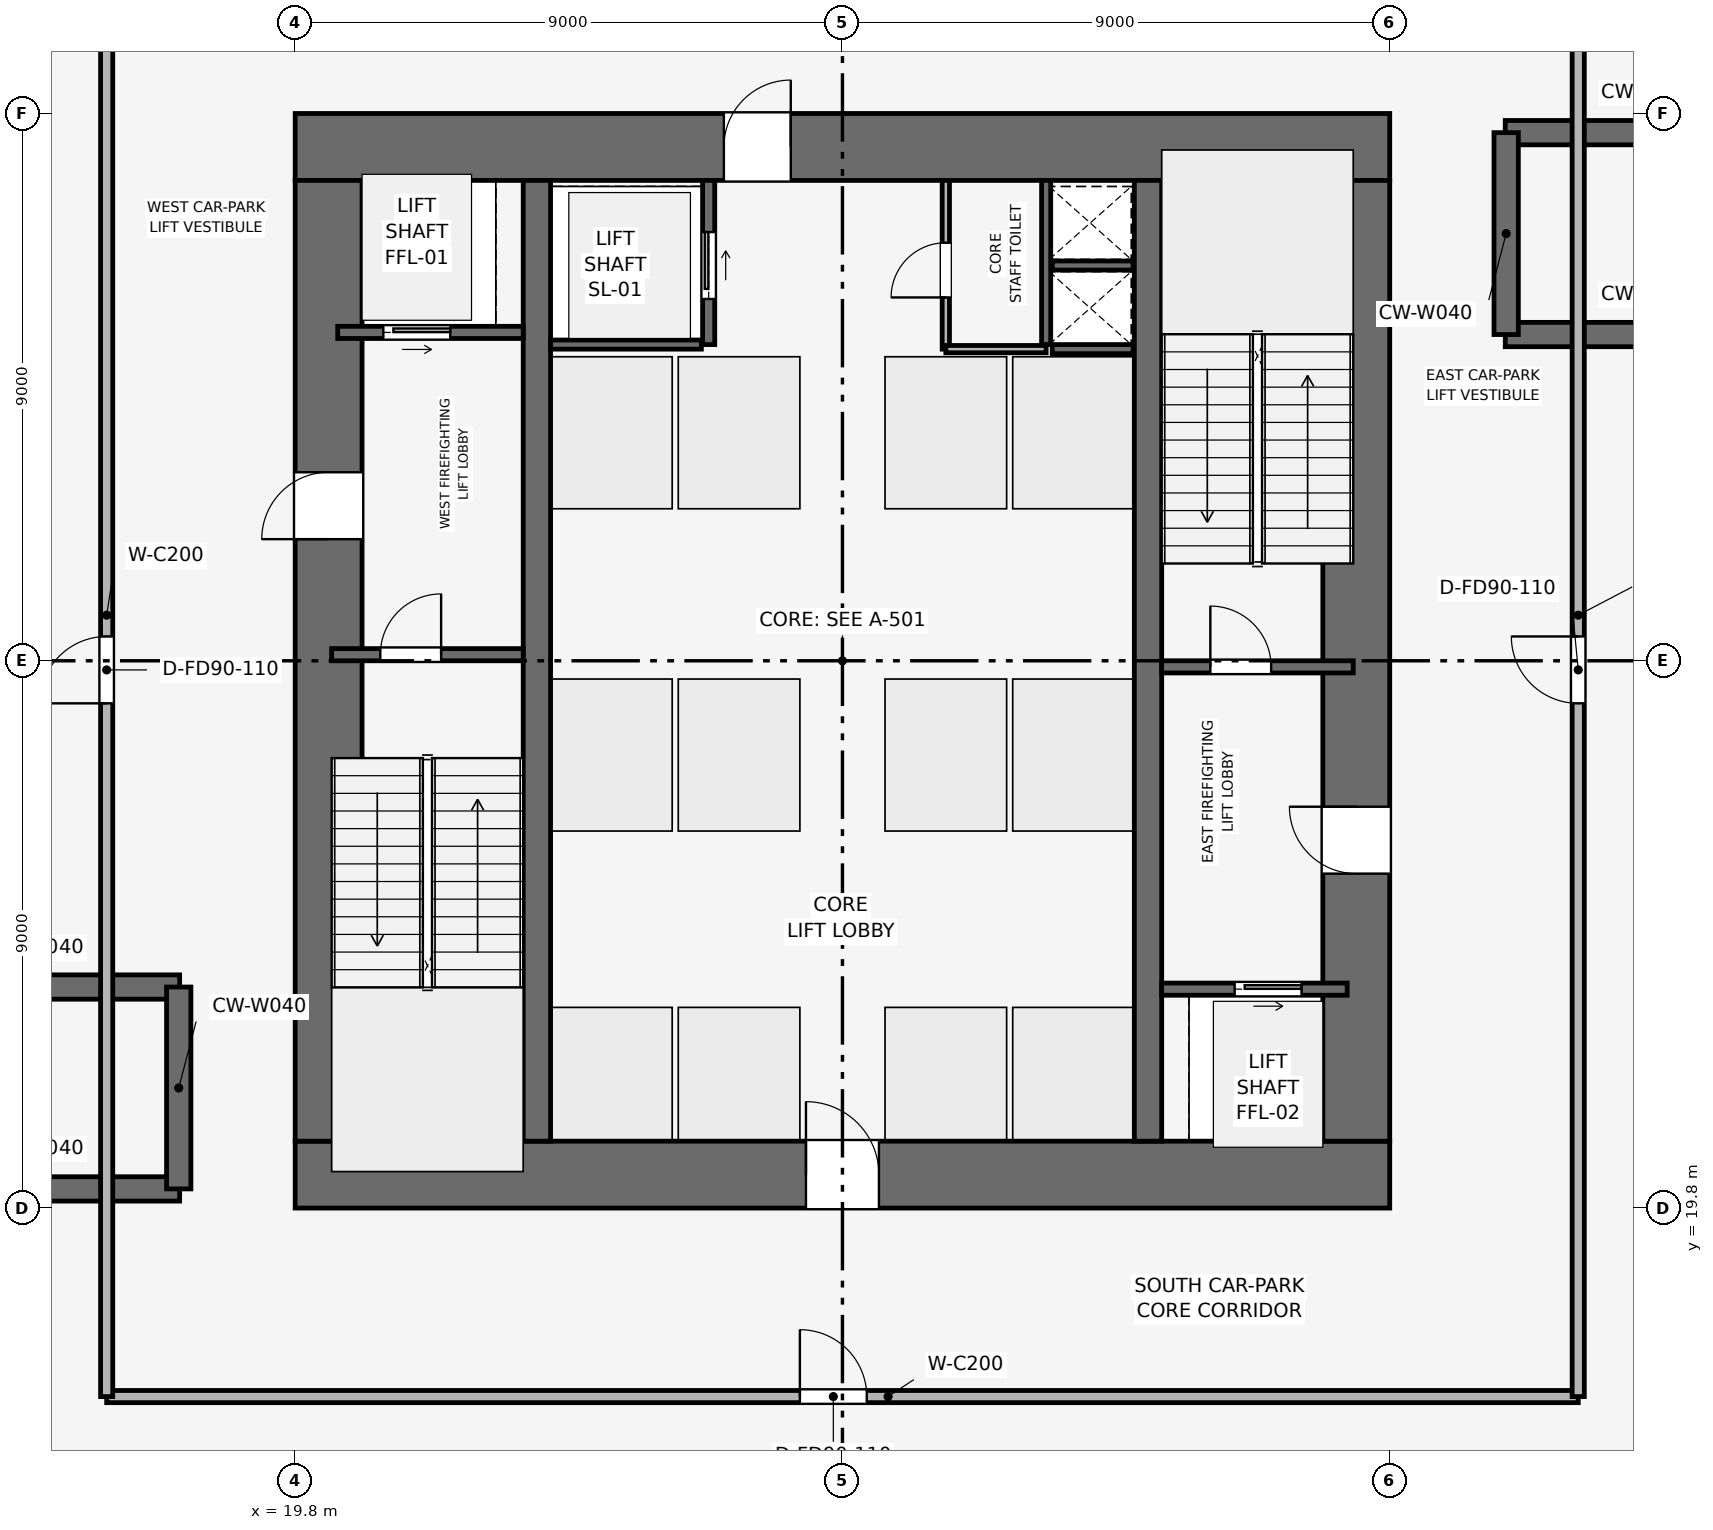
"""IFC4 building model, lengths in metres.
Left out: names, types, materials, properties, quantities, classifications, styles, units other than length and angle.
Written with IfcOpenShell. Run it as: python <this file> out.ifc"""

import sys

from ifc_helpers import new_model, si_unit, direction, frame, frame_2d, origin, place, context, subcontext, project, spatial, rectangle, extrude, element, fill, save


model = new_model("IFC4")
c1 = context("Model", 3, precision=1e-05, world=origin(), true_north=direction((0.0, 1.0)))
c2 = subcontext(c1, "Body", "Model", "MODEL_VIEW")
j1 = project(units=[si_unit("LENGTHUNIT", "METRE"), si_unit("PLANEANGLEUNIT", "RADIAN")], contexts=[c1])
p1 = place(None, origin())
s1 = spatial("IfcSite", under=j1, at=p1, CompositionType="ELEMENT")
p2 = place(p1, origin())
s2 = spatial("IfcBuilding", under=s1, at=p2, CompositionType="ELEMENT")
p3 = place(p2, frame((0.0, 0.0, -4.8)))
s3 = spatial("IfcBuildingStorey", under=s2, at=p3, CompositionType="ELEMENT", Elevation=-4.8)
p4 = place(p3, frame((19.8, 20.35, 0.0), z_axis=(0.0, 0.0, 1.0), x_axis=(1.0, 0.0, 0.0)))
e1 = element("IfcWall", 1, at=p4, inside=s3, PredefinedType="SHEAR", context=c2, shape_type="SweptSolid", body=[
    extrude(rectangle(XDim=18.0, YDim=1.1, at=frame_2d((9.0, 0.0))), origin(), (0.0, 0.0, 1.0), 4.8),
])
p5 = place(p4, frame((8.4, 0.0, 0.0)))
e2 = element("IfcOpeningElement", 2, at=p5, cuts=e1, PredefinedType="OPENING", context=c2, shape_type="SweptSolid", body=[
    extrude(rectangle(XDim=1.2, YDim=2.2, at=frame_2d((0.6, 1.1))), frame((0.0, 0.56, 0.0), z_axis=(0.0, -1.0, 0.0), x_axis=(1.0, 0.0, 0.0)), (0.0, 0.0, 1.0), 1.12),
])
p6 = place(p3, frame((19.8, 37.25, 0.0), z_axis=(0.0, 0.0, 1.0), x_axis=(1.0, 0.0, 0.0)))
e3 = element("IfcWall", 3, at=p6, inside=s3, PredefinedType="SHEAR", context=c2, shape_type="SweptSolid", body=[
    extrude(rectangle(XDim=18.0, YDim=1.1, at=frame_2d((9.0, 0.0))), origin(), (0.0, 0.0, 1.0), 4.8),
])
p7 = place(p6, frame((7.05, 0.0, 0.0)))
e4 = element("IfcOpeningElement", 4, at=p7, cuts=e3, PredefinedType="OPENING", context=c2, shape_type="SweptSolid", body=[
    extrude(rectangle(XDim=1.1, YDim=2.15, at=frame_2d((0.55, 1.075))), frame((0.0, 0.56, 0.0), z_axis=(0.0, -1.0, 0.0), x_axis=(1.0, 0.0, 0.0)), (0.0, 0.0, 1.0), 1.12),
])
p8 = place(p3, frame((20.35, 20.9, 0.0), z_axis=(0.0, 0.0, 1.0), x_axis=(0.0, 1.0, 0.0)))
e5 = element("IfcWall", 5, at=p8, inside=s3, PredefinedType="SHEAR", context=c2, shape_type="SweptSolid", body=[
    extrude(rectangle(XDim=15.8, YDim=1.1, at=frame_2d((7.9, 0.0))), origin(), (0.0, 0.0, 1.0), 4.8),
])
p9 = place(p8, frame((9.9, 0.0, 0.0)))
e6 = element("IfcOpeningElement", 6, at=p9, cuts=e5, PredefinedType="OPENING", context=c2, shape_type="SweptSolid", body=[
    extrude(rectangle(XDim=1.1, YDim=2.15, at=frame_2d((0.55, 1.075))), frame((0.0, 0.56, 0.0), z_axis=(0.0, -1.0, 0.0), x_axis=(1.0, 0.0, 0.0)), (0.0, 0.0, 1.0), 1.12),
])
p10 = place(p3, frame((37.25, 20.9, 0.0), z_axis=(0.0, 0.0, 1.0), x_axis=(0.0, 1.0, 0.0)))
e7 = element("IfcWall", 7, at=p10, inside=s3, PredefinedType="SHEAR", context=c2, shape_type="SweptSolid", body=[
    extrude(rectangle(XDim=15.8, YDim=1.1, at=frame_2d((7.9, 0.0))), origin(), (0.0, 0.0, 1.0), 4.8),
])
p11 = place(p10, frame((4.4, 0.0, 0.0)))
e8 = element("IfcOpeningElement", 8, at=p11, cuts=e7, PredefinedType="OPENING", context=c2, shape_type="SweptSolid", body=[
    extrude(rectangle(XDim=1.1, YDim=2.15, at=frame_2d((0.55, 1.075))), frame((0.0, 0.56, 0.0), z_axis=(0.0, -1.0, 0.0), x_axis=(1.0, 0.0, 0.0)), (0.0, 0.0, 1.0), 1.12),
])
for number, where, z_axis, x_axis in (
    (9, (23.775, 20.9, 0.0), (0.0, 0.0, 1.0), (0.0, 1.0, 0.0)),
    (10, (33.825, 20.9, 0.0), (0.0, 0.0, 1.0), (0.0, 1.0, 0.0)),
):
    element("IfcWall", number, at=place(p3, frame(where, z_axis=z_axis, x_axis=x_axis)), inside=s3, PredefinedType="SHEAR", context=c2, shape_type="SweptSolid", body=[
        extrude(rectangle(XDim=15.8, YDim=0.45, at=frame_2d((7.9, 0.0))), origin(), (0.0, 0.0, 1.0), 4.8),
    ])
for number, where, z_axis, x_axis in (
    (11, (13.2, 20.115, 0.002), (0.0, 0.0, 1.0), (1.0, 0.0, 0.0)),
    (12, (13.2, 23.435, 0.002), (0.0, 0.0, 1.0), (1.0, 0.0, 0.0)),
):
    element("IfcWall", number, at=place(p3, frame(where, z_axis=z_axis, x_axis=x_axis)), inside=s3, PredefinedType="SHEAR", context=c2, shape_type="SweptSolid", body=[
        extrude(rectangle(XDim=4.7, YDim=0.4, at=frame_2d((2.35, 0.0))), origin(), (0.0, 0.0, 1.0), 4.396),
    ])
p12 = place(p3, frame((17.885, 20.115, 0.002), z_axis=(0.0, 0.0, 1.0), x_axis=(0.0, 1.0, 0.0)))
e13 = element("IfcWall", 13, at=p12, inside=s3, PredefinedType="SHEAR", context=c2, shape_type="SweptSolid", body=[
    extrude(rectangle(XDim=3.32, YDim=0.4, at=frame_2d((1.66, 0.0))), origin(), (0.0, 0.0, 1.0), 4.396),
])
for number, where, z_axis, x_axis in (
    (14, (39.7, 34.165, 0.002), (0.0, 0.0, 1.0), (1.0, 0.0, 0.0)),
    (15, (39.7, 37.485, 0.002), (0.0, 0.0, 1.0), (1.0, 0.0, 0.0)),
):
    element("IfcWall", number, at=place(p3, frame(where, z_axis=z_axis, x_axis=x_axis)), inside=s3, PredefinedType="SHEAR", context=c2, shape_type="SweptSolid", body=[
        extrude(rectangle(XDim=4.7, YDim=0.4, at=frame_2d((2.35, 0.0))), origin(), (0.0, 0.0, 1.0), 4.396),
    ])
p13 = place(p3, frame((39.715, 34.165, 0.002), z_axis=(0.0, 0.0, 1.0), x_axis=(0.0, 1.0, 0.0)))
e16 = element("IfcWall", 16, at=p13, inside=s3, PredefinedType="SHEAR", context=c2, shape_type="SweptSolid", body=[
    extrude(rectangle(XDim=3.32, YDim=0.4, at=frame_2d((1.66, 0.0))), origin(), (0.0, 0.0, 1.0), 4.396),
])
p14 = place(p3, frame((20.4, 28.9, 0.0), z_axis=(0.0, 0.0, 1.0), x_axis=(1.0, 0.0, 0.0)))
e17 = element("IfcWall", 17, at=p14, inside=s3, PredefinedType="SHEAR", context=c2, shape_type="SweptSolid", body=[
    extrude(rectangle(XDim=3.15, YDim=0.2, at=frame_2d((1.575, 0.0))), origin(), (0.0, 0.0, 1.0), 4.4),
])
p15 = place(p14, frame((0.8, 0.0, 0.0)))
e18 = element("IfcOpeningElement", 18, at=p15, cuts=e17, PredefinedType="OPENING", context=c2, shape_type="SweptSolid", body=[
    extrude(rectangle(XDim=1.0, YDim=2.1, at=frame_2d((0.5, 1.05))), frame((0.0, 0.11, 0.0), z_axis=(0.0, -1.0, 0.0), x_axis=(1.0, 0.0, 0.0)), (0.0, 0.0, 1.0), 0.22),
])
p16 = place(p3, frame((34.05, 28.7, 0.0), z_axis=(0.0, 0.0, 1.0), x_axis=(1.0, 0.0, 0.0)))
e19 = element("IfcWall", 19, at=p16, inside=s3, PredefinedType="SHEAR", context=c2, shape_type="SweptSolid", body=[
    extrude(rectangle(XDim=3.15, YDim=0.2, at=frame_2d((1.575, 0.0))), origin(), (0.0, 0.0, 1.0), 4.4),
])
p17 = place(p16, frame((0.8, 0.0, 0.0)))
e20 = element("IfcOpeningElement", 20, at=p17, cuts=e19, PredefinedType="OPENING", context=c2, shape_type="SweptSolid", body=[
    extrude(rectangle(XDim=1.0, YDim=2.1, at=frame_2d((0.5, 1.05))), frame((0.0, 0.11, 0.0), z_axis=(0.0, -1.0, 0.0), x_axis=(1.0, 0.0, 0.0)), (0.0, 0.0, 1.0), 0.22),
])
p18 = place(p3, frame((32.15, 34.0, 0.0), z_axis=(0.0, 0.0, 1.0), x_axis=(0.0, 1.0, 0.0)))
e21 = element("IfcWall", 21, at=p18, inside=s3, PredefinedType="SHEAR", context=c2, shape_type="SweptSolid", body=[
    extrude(rectangle(XDim=2.7, YDim=0.15, at=frame_2d((1.35, 0.0))), origin(), (0.0, 0.0, 1.0), 4.4),
])
for number, where, z_axis, x_axis in (
    (22, (32.25, 33.925, 0.0), (0.0, 0.0, 1.0), (1.0, 0.0, 0.0)),
    (23, (32.25, 35.3, 0.0), (0.0, 0.0, 1.0), (1.0, 0.0, 0.0)),
):
    element("IfcWall", number, at=place(p3, frame(where, z_axis=z_axis, x_axis=x_axis)), inside=s3, PredefinedType="SHEAR", context=c2, shape_type="SweptSolid", body=[
        extrude(rectangle(XDim=1.33, YDim=0.15, at=frame_2d((0.665, 0.0))), origin(), (0.0, 0.0, 1.0), 4.4),
    ])
p19 = place(p3, frame((20.5, 34.2, 0.0), z_axis=(0.0, 0.0, 1.0), x_axis=(1.0, 0.0, 0.0)))
e24 = element("IfcWall", 24, at=p19, inside=s3, PredefinedType="SHEAR", context=c2, shape_type="SweptSolid", body=[
    extrude(rectangle(XDim=3.05, YDim=0.2, at=frame_2d((1.525, 0.0))), origin(), (0.0, 0.0, 1.0), 4.4),
])
p20 = place(p19, frame((0.75, 0.0, 0.0)))
e25 = element("IfcOpeningElement", 25, at=p20, cuts=e24, PredefinedType="OPENING", context=c2, shape_type="SweptSolid", body=[
    extrude(rectangle(XDim=1.1, YDim=2.15, at=frame_2d((0.55, 1.075))), frame((0.0, 0.11, 0.0), z_axis=(0.0, -1.0, 0.0), x_axis=(1.0, 0.0, 0.0)), (0.0, 0.0, 1.0), 0.22),
])
p21 = place(p3, frame((34.05, 23.4, 0.0), z_axis=(0.0, 0.0, 1.0), x_axis=(1.0, 0.0, 0.0)))
e26 = element("IfcWall", 26, at=p21, inside=s3, PredefinedType="SHEAR", context=c2, shape_type="SweptSolid", body=[
    extrude(rectangle(XDim=3.05, YDim=0.2, at=frame_2d((1.525, 0.0))), origin(), (0.0, 0.0, 1.0), 4.4),
])
p22 = place(p21, frame((1.2, 0.0, 0.0)))
e27 = element("IfcOpeningElement", 27, at=p22, cuts=e26, PredefinedType="OPENING", context=c2, shape_type="SweptSolid", body=[
    extrude(rectangle(XDim=1.1, YDim=2.15, at=frame_2d((0.55, 1.075))), frame((0.0, 0.11, 0.0), z_axis=(0.0, -1.0, 0.0), x_axis=(1.0, 0.0, 0.0)), (0.0, 0.0, 1.0), 0.22),
])
p23 = place(p3, frame((26.6, 34.0, 0.0), z_axis=(0.0, 0.0, 1.0), x_axis=(0.0, 1.0, 0.0)))
e28 = element("IfcWall", 28, at=p23, inside=s3, PredefinedType="SHEAR", context=c2, shape_type="SweptSolid", body=[
    extrude(rectangle(XDim=2.7, YDim=0.2, at=frame_2d((1.35, 0.0))), origin(), (0.0, 0.0, 1.0), 4.4),
])
p24 = place(p23, frame((0.75, 0.0, 0.0)))
e29 = element("IfcOpeningElement", 29, at=p24, cuts=e28, PredefinedType="OPENING", context=c2, shape_type="SweptSolid", body=[
    extrude(rectangle(XDim=1.1, YDim=2.15, at=frame_2d((0.55, 1.075))), frame((0.0, 0.11, 0.0), z_axis=(0.0, -1.0, 0.0), x_axis=(1.0, 0.0, 0.0)), (0.0, 0.0, 1.0), 0.22),
])
p25 = place(p3, frame((24.0, 34.0, 0.0), z_axis=(0.0, 0.0, 1.0), x_axis=(1.0, 0.0, 0.0)))
e30 = element("IfcWall", 30, at=p25, inside=s3, PredefinedType="SHEAR", context=c2, shape_type="SweptSolid", body=[
    extrude(rectangle(XDim=2.48, YDim=0.15, at=frame_2d((1.24, 0.0))), origin(), (0.0, 0.0, 1.0), 4.4),
])
p26 = place(p3, frame((30.5, 33.925, 0.0), z_axis=(0.0, 0.0, 1.0), x_axis=(0.0, 1.0, 0.0)))
e31 = element("IfcWall", 31, at=p26, inside=s3, PredefinedType="PARTITIONING", context=c2, shape_type="SweptSolid", body=[
    extrude(rectangle(XDim=2.775, YDim=0.12, at=frame_2d((1.387, 0.0))), origin(), (0.0, 0.0, 1.0), 4.4),
])
p27 = place(p26, frame((0.85, 0.0, 0.0)))
e32 = element("IfcOpeningElement", 32, at=p27, cuts=e31, PredefinedType="OPENING", context=c2, shape_type="SweptSolid", body=[
    extrude(rectangle(XDim=0.9, YDim=2.1, at=frame_2d((0.45, 1.05))), frame((0.0, 0.07, 0.0), z_axis=(0.0, -1.0, 0.0), x_axis=(1.0, 0.0, 0.0)), (0.0, 0.0, 1.0), 0.14),
])
p28 = place(p3, frame((30.5, 33.925, 0.0), z_axis=(0.0, 0.0, 1.0), x_axis=(1.0, 0.0, 0.0)))
e33 = element("IfcWall", 33, at=p28, inside=s3, PredefinedType="PARTITIONING", context=c2, shape_type="SweptSolid", body=[
    extrude(rectangle(XDim=1.65, YDim=0.12, at=frame_2d((0.825, 0.0))), origin(), (0.0, 0.0, 1.0), 4.4),
])
p29 = place(p3, frame((16.7, 16.7, 0.0), z_axis=(0.0, 0.0, 1.0), x_axis=(1.0, 0.0, 0.0)))
e34 = element("IfcWall", 34, at=p29, inside=s3, PredefinedType="PARTITIONING", context=c2, shape_type="SweptSolid", body=[
    extrude(rectangle(XDim=24.2, YDim=0.2, at=frame_2d((12.1, 0.0))), origin(), (0.0, 0.0, 1.0), 2.985),
])
p30 = place(p29, frame((11.4, 0.0, 0.0)))
e35 = element("IfcOpeningElement", 35, at=p30, cuts=e34, PredefinedType="OPENING", context=c2, shape_type="SweptSolid", body=[
    extrude(rectangle(XDim=1.1, YDim=2.15, at=frame_2d((0.55, 1.075))), frame((0.0, 0.11, 0.0), z_axis=(0.0, -1.0, 0.0), x_axis=(1.0, 0.0, 0.0)), (0.0, 0.0, 1.0), 0.22),
])
p31 = place(p3, frame((16.7, 16.7, 0.0), z_axis=(0.0, 0.0, 1.0), x_axis=(0.0, 1.0, 0.0)))
e36 = element("IfcWall", 36, at=p31, inside=s3, PredefinedType="PARTITIONING", context=c2, shape_type="SweptSolid", body=[
    extrude(rectangle(XDim=24.2, YDim=0.2, at=frame_2d((12.1, 0.0))), origin(), (0.0, 0.0, 1.0), 2.985),
])
p32 = place(p31, frame((11.4, 0.0, 0.0)))
e37 = element("IfcOpeningElement", 37, at=p32, cuts=e36, PredefinedType="OPENING", context=c2, shape_type="SweptSolid", body=[
    extrude(rectangle(XDim=1.1, YDim=2.15, at=frame_2d((0.55, 1.075))), frame((0.0, 0.11, 0.0), z_axis=(0.0, -1.0, 0.0), x_axis=(1.0, 0.0, 0.0)), (0.0, 0.0, 1.0), 0.22),
])
p33 = place(p3, frame((40.9, 16.7, 0.0), z_axis=(0.0, 0.0, 1.0), x_axis=(0.0, 1.0, 0.0)))
e38 = element("IfcWall", 38, at=p33, inside=s3, PredefinedType="PARTITIONING", context=c2, shape_type="SweptSolid", body=[
    extrude(rectangle(XDim=24.2, YDim=0.2, at=frame_2d((12.1, 0.0))), origin(), (0.0, 0.0, 1.0), 2.985),
])
p34 = place(p33, frame((11.4, 0.0, 0.0)))
e39 = element("IfcOpeningElement", 39, at=p34, cuts=e38, PredefinedType="OPENING", context=c2, shape_type="SweptSolid", body=[
    extrude(rectangle(XDim=1.1, YDim=2.15, at=frame_2d((0.55, 1.075))), frame((0.0, 0.11, 0.0), z_axis=(0.0, -1.0, 0.0), x_axis=(1.0, 0.0, 0.0)), (0.0, 0.0, 1.0), 0.22),
])
p35 = place(p15, origin())
e40 = element("IfcDoor", 40, at=p35, inside=s3, OperationType="SINGLE_SWING_RIGHT", PredefinedType="DOOR", context=c2, shape_type="SweptSolid", body=[
    extrude(rectangle(XDim=1.0, YDim=2.1, at=frame_2d((0.5, 1.05))), frame((0.0, 0.025, 0.0), z_axis=(0.0, -1.0, 0.0), x_axis=(1.0, 0.0, 0.0)), (0.0, 0.0, 1.0), 0.05),
])
fill(e18, e40)
p36 = place(p17, origin())
e41 = element("IfcDoor", 41, at=p36, inside=s3, OperationType="SINGLE_SWING_LEFT", PredefinedType="DOOR", context=c2, shape_type="SweptSolid", body=[
    extrude(rectangle(XDim=1.0, YDim=2.1, at=frame_2d((0.5, 1.05))), frame((0.0, 0.025, 0.0), z_axis=(0.0, -1.0, 0.0), x_axis=(1.0, 0.0, 0.0)), (0.0, 0.0, 1.0), 0.05),
])
fill(e20, e41)
p37 = place(p20, origin())
e42 = element("IfcDoor", 42, at=p37, inside=s3, OperationType="SLIDING_TO_RIGHT", PredefinedType="DOOR", context=c2, shape_type="SweptSolid", body=[
    extrude(rectangle(XDim=1.1, YDim=2.15, at=frame_2d((0.55, 1.075))), frame((0.0, 0.025, 0.0), z_axis=(0.0, -1.0, 0.0), x_axis=(1.0, 0.0, 0.0)), (0.0, 0.0, 1.0), 0.05),
])
fill(e25, e42)
p38 = place(p22, origin())
e43 = element("IfcDoor", 43, at=p38, inside=s3, OperationType="SLIDING_TO_RIGHT", PredefinedType="DOOR", context=c2, shape_type="SweptSolid", body=[
    extrude(rectangle(XDim=1.1, YDim=2.15, at=frame_2d((0.55, 1.075))), frame((0.0, 0.025, 0.0), z_axis=(0.0, -1.0, 0.0), x_axis=(1.0, 0.0, 0.0)), (0.0, 0.0, 1.0), 0.05),
])
fill(e27, e43)
p39 = place(p24, origin())
e44 = element("IfcDoor", 44, at=p39, inside=s3, OperationType="SLIDING_TO_RIGHT", PredefinedType="DOOR", context=c2, shape_type="SweptSolid", body=[
    extrude(rectangle(XDim=1.1, YDim=2.15, at=frame_2d((0.55, 1.075))), frame((0.0, 0.025, 0.0), z_axis=(0.0, -1.0, 0.0), x_axis=(1.0, 0.0, 0.0)), (0.0, 0.0, 1.0), 0.05),
])
fill(e29, e44)
p40 = place(p27, origin())
e45 = element("IfcDoor", 45, at=p40, inside=s3, OperationType="SINGLE_SWING_LEFT", PredefinedType="DOOR", context=c2, shape_type="SweptSolid", body=[
    extrude(rectangle(XDim=0.9, YDim=2.1, at=frame_2d((0.45, 1.05))), frame((0.0, 0.025, 0.0), z_axis=(0.0, -1.0, 0.0), x_axis=(1.0, 0.0, 0.0)), (0.0, 0.0, 1.0), 0.05),
])
fill(e32, e45)
p41 = place(p30, origin())
e46 = element("IfcDoor", 46, at=p41, inside=s3, OperationType="SINGLE_SWING_LEFT", PredefinedType="DOOR", context=c2, shape_type="SweptSolid", body=[
    extrude(rectangle(XDim=1.1, YDim=2.15, at=frame_2d((0.55, 1.075))), frame((0.0, 0.025, 0.0), z_axis=(0.0, -1.0, 0.0), x_axis=(1.0, 0.0, 0.0)), (0.0, 0.0, 1.0), 0.05),
])
fill(e35, e46)
p42 = place(p32, origin())
e47 = element("IfcDoor", 47, at=p42, inside=s3, OperationType="SINGLE_SWING_LEFT", PredefinedType="DOOR", context=c2, shape_type="SweptSolid", body=[
    extrude(rectangle(XDim=1.1, YDim=2.15, at=frame_2d((0.55, 1.075))), frame((0.0, 0.025, 0.0), z_axis=(0.0, -1.0, 0.0), x_axis=(1.0, 0.0, 0.0)), (0.0, 0.0, 1.0), 0.05),
])
fill(e37, e47)
p43 = place(p34, origin())
e48 = element("IfcDoor", 48, at=p43, inside=s3, OperationType="SINGLE_SWING_RIGHT", PredefinedType="DOOR", context=c2, shape_type="SweptSolid", body=[
    extrude(rectangle(XDim=1.1, YDim=2.15, at=frame_2d((0.55, 1.075))), frame((0.0, 0.025, 0.0), z_axis=(0.0, -1.0, 0.0), x_axis=(1.0, 0.0, 0.0)), (0.0, 0.0, 1.0), 0.05),
])
fill(e39, e48)
p44 = place(p9, origin())
e49 = element("IfcDoor", 49, at=p44, inside=s3, OperationType="SINGLE_SWING_LEFT", PredefinedType="DOOR", context=c2, shape_type="SweptSolid", body=[
    extrude(rectangle(XDim=1.1, YDim=2.15, at=frame_2d((0.55, 1.075))), frame((0.0, 0.025, 0.0), z_axis=(0.0, -1.0, 0.0), x_axis=(1.0, 0.0, 0.0)), (0.0, 0.0, 1.0), 0.05),
])
fill(e6, e49)
p45 = place(p11, origin())
e50 = element("IfcDoor", 50, at=p45, inside=s3, OperationType="SINGLE_SWING_RIGHT", PredefinedType="DOOR", context=c2, shape_type="SweptSolid", body=[
    extrude(rectangle(XDim=1.1, YDim=2.15, at=frame_2d((0.55, 1.075))), frame((0.0, 0.025, 0.0), z_axis=(0.0, -1.0, 0.0), x_axis=(1.0, 0.0, 0.0)), (0.0, 0.0, 1.0), 0.05),
])
fill(e8, e50)
p46 = place(p5, origin())
e51 = element("IfcDoor", 51, at=p46, inside=s3, OperationType="SINGLE_SWING_LEFT", PredefinedType="DOOR", context=c2, shape_type="SweptSolid", body=[
    extrude(rectangle(XDim=1.2, YDim=2.2, at=frame_2d((0.6, 1.1))), frame((0.0, 0.025, 0.0), z_axis=(0.0, -1.0, 0.0), x_axis=(1.0, 0.0, 0.0)), (0.0, 0.0, 1.0), 0.05),
])
fill(e2, e51)
p47 = place(p7, origin())
e52 = element("IfcDoor", 52, at=p47, inside=s3, OperationType="SINGLE_SWING_RIGHT", PredefinedType="DOOR", context=c2, shape_type="SweptSolid", body=[
    extrude(rectangle(XDim=1.1, YDim=2.15, at=frame_2d((0.55, 1.075))), frame((0.0, 0.025, 0.0), z_axis=(0.0, -1.0, 0.0), x_axis=(1.0, 0.0, 0.0)), (0.0, 0.0, 1.0), 0.05),
])
fill(e4, e52)
save(model, sys.argv[1])
